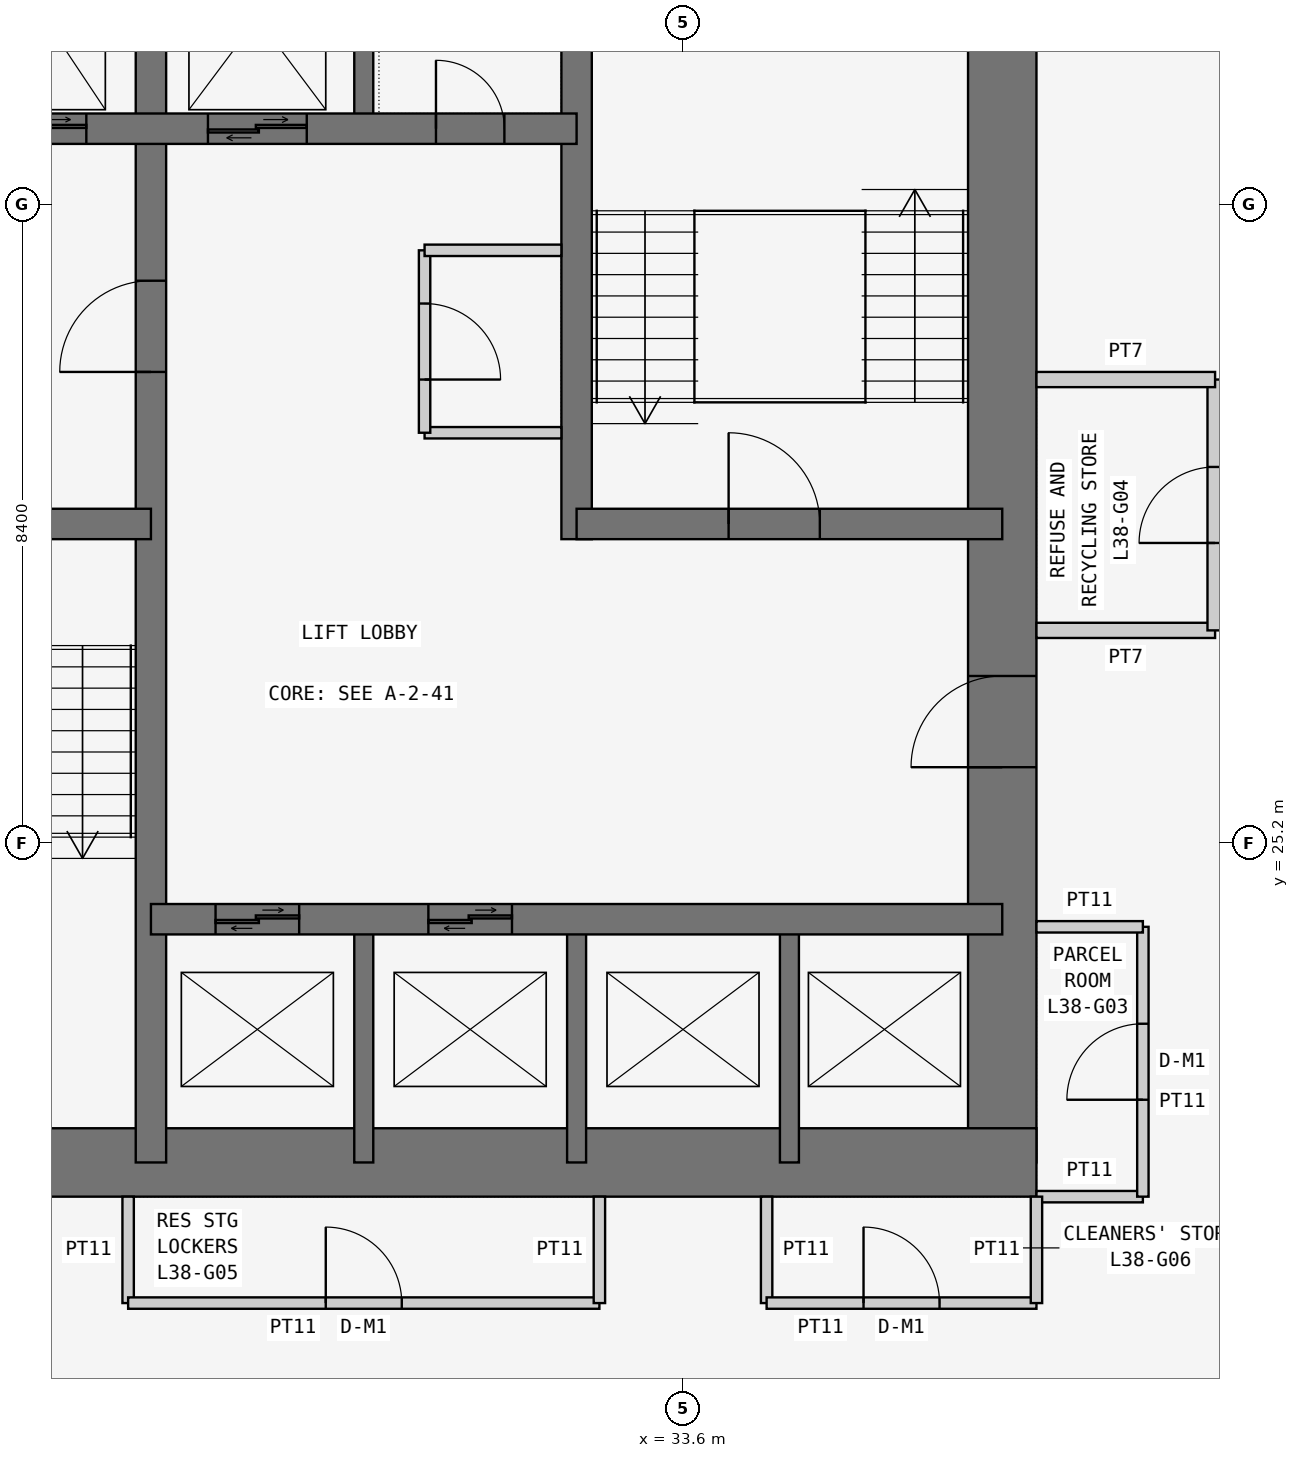
"""IFC4 building model, lengths in metres.
Left out: names, types, materials, properties, quantities, classifications, styles, units other than length and angle.
Written with IfcOpenShell. Run it as: python <this file> out.ifc"""

import sys

from ifc_helpers import new_model, si_unit, direction, frame, frame_2d, origin, place, context, subcontext, project, spatial, rectangle, extrude, element, fill, save


model = new_model("IFC4")
c1 = context("Model", 3, precision=1e-05, world=origin(), true_north=direction((0.0, 1.0)))
c2 = subcontext(c1, "Body", "Model", "MODEL_VIEW")
j1 = project(units=[si_unit("LENGTHUNIT", "METRE"), si_unit("PLANEANGLEUNIT", "RADIAN")], contexts=[c1])
p1 = place(None, origin())
s1 = spatial("IfcSite", under=j1, at=p1, CompositionType="ELEMENT")
p2 = place(p1, origin())
s2 = spatial("IfcBuilding", under=s1, at=p2, CompositionType="ELEMENT")
p3 = place(p2, frame((0.0, 0.0, 148.5)))
s3 = spatial("IfcBuildingStorey", under=s2, at=p3, CompositionType="ELEMENT", Elevation=148.5)
p4 = place(p3, frame((21.0, 21.0, 0.0), z_axis=(0.0, 0.0, 1.0), x_axis=(1.0, 0.0, 0.0)))
e1 = element("IfcWall", 1, at=p4, inside=s3, PredefinedType="SHEAR", context=c2, shape_type="SweptSolid", body=[
    extrude(rectangle(XDim=17.25, YDim=0.9, at=frame_2d((8.625, 0.0))), origin(), (0.0, 0.0, 1.0), 3.6),
])
p5 = place(p3, frame((37.8, 21.0, 0.0), z_axis=(0.0, 0.0, 1.0), x_axis=(0.0, 1.0, 0.0)))
e2 = element("IfcWall", 2, at=p5, inside=s3, PredefinedType="SHEAR", context=c2, shape_type="SweptSolid", body=[
    extrude(rectangle(XDim=17.25, YDim=0.9, at=frame_2d((8.625, 0.0))), origin(), (0.0, 0.0, 1.0), 3.6),
])
p6 = place(p5, frame((5.2, 0.0, 0.0)))
e3 = element("IfcOpeningElement", 3, at=p6, cuts=e2, PredefinedType="OPENING", context=c2, shape_type="SweptSolid", body=[
    extrude(rectangle(XDim=1.2, YDim=2.1, at=frame_2d((0.6, 1.05))), frame((0.0, 0.46, 0.0), z_axis=(0.0, -1.0, 0.0), x_axis=(1.0, 0.0, 0.0)), (0.0, 0.0, 1.0), 0.92),
])
p7 = place(p3, frame((26.6, 21.0, 0.0), z_axis=(0.0, 0.0, 1.0), x_axis=(0.0, 1.0, 0.0)))
e4 = element("IfcWall", 4, at=p7, inside=s3, PredefinedType="SHEAR", context=c2, shape_type="SweptSolid", body=[
    extrude(rectangle(XDim=16.8, YDim=0.4, at=frame_2d((8.4, 0.0))), origin(), (0.0, 0.0, 1.0), 3.6),
])
p8 = place(p7, frame((10.4, 0.0, 0.0)))
e5 = element("IfcOpeningElement", 5, at=p8, cuts=e4, PredefinedType="OPENING", context=c2, shape_type="SweptSolid", body=[
    extrude(rectangle(XDim=1.2, YDim=2.1, at=frame_2d((0.6, 1.05))), frame((0.0, 0.21, 0.0), z_axis=(0.0, -1.0, 0.0), x_axis=(1.0, 0.0, 0.0)), (0.0, 0.0, 1.0), 0.42),
])
p9 = place(p3, frame((21.0, 29.4, 0.0), z_axis=(0.0, 0.0, 1.0), x_axis=(1.0, 0.0, 0.0)))
e6 = element("IfcWall", 6, at=p9, inside=s3, PredefinedType="SHEAR", context=c2, shape_type="SweptSolid", body=[
    extrude(rectangle(XDim=5.6, YDim=0.4, at=frame_2d((2.8, 0.0))), origin(), (0.0, 0.0, 1.0), 3.6),
])
p10 = place(p9, frame((2.3, 0.0, 0.0)))
e7 = element("IfcOpeningElement", 7, at=p10, cuts=e6, PredefinedType="OPENING", context=c2, shape_type="SweptSolid", body=[
    extrude(rectangle(XDim=1.2, YDim=2.1, at=frame_2d((0.6, 1.05))), frame((0.0, 0.21, 0.0), z_axis=(0.0, -1.0, 0.0), x_axis=(1.0, 0.0, 0.0)), (0.0, 0.0, 1.0), 0.42),
])
p11 = place(p3, frame((21.0, 34.6, 0.0), z_axis=(0.0, 0.0, 1.0), x_axis=(1.0, 0.0, 0.0)))
e8 = element("IfcWall", 8, at=p11, inside=s3, PredefinedType="SHEAR", context=c2, shape_type="SweptSolid", body=[
    extrude(rectangle(XDim=11.2, YDim=0.4, at=frame_2d((5.6, 0.0))), origin(), (0.0, 0.0, 1.0), 3.6),
])
p12 = place(p11, frame((9.35, 0.0, 0.0)))
e9 = element("IfcOpeningElement", 9, at=p12, cuts=e8, PredefinedType="OPENING", context=c2, shape_type="SweptSolid", body=[
    extrude(rectangle(XDim=0.9, YDim=2.1, at=frame_2d((0.45, 1.05))), frame((0.0, 0.21, 0.0), z_axis=(0.0, -1.0, 0.0), x_axis=(1.0, 0.0, 0.0)), (0.0, 0.0, 1.0), 0.42),
])
p13 = place(p11, frame((1.0, 0.0, 0.0)))
e10 = element("IfcOpeningElement", 10, at=p13, cuts=e8, PredefinedType="OPENING", context=c2, shape_type="SweptSolid", body=[
    extrude(rectangle(XDim=1.1, YDim=2.1, at=frame_2d((0.55, 1.05))), frame((0.0, 0.21, 0.0), z_axis=(0.0, -1.0, 0.0), x_axis=(1.0, 0.0, 0.0)), (0.0, 0.0, 1.0), 0.42),
])
p14 = place(p11, frame((3.65, 0.0, 0.0)))
e11 = element("IfcOpeningElement", 11, at=p14, cuts=e8, PredefinedType="OPENING", context=c2, shape_type="SweptSolid", body=[
    extrude(rectangle(XDim=1.1, YDim=2.1, at=frame_2d((0.55, 1.05))), frame((0.0, 0.21, 0.0), z_axis=(0.0, -1.0, 0.0), x_axis=(1.0, 0.0, 0.0)), (0.0, 0.0, 1.0), 0.42),
])
p15 = place(p11, frame((6.35, 0.0, 0.0)))
e12 = element("IfcOpeningElement", 12, at=p15, cuts=e8, PredefinedType="OPENING", context=c2, shape_type="SweptSolid", body=[
    extrude(rectangle(XDim=1.3, YDim=2.1, at=frame_2d((0.65, 1.05))), frame((0.0, 0.21, 0.0), z_axis=(0.0, -1.0, 0.0), x_axis=(1.0, 0.0, 0.0)), (0.0, 0.0, 1.0), 0.42),
])
p16 = place(p3, frame((26.6, 24.2, 0.0), z_axis=(0.0, 0.0, 1.0), x_axis=(1.0, 0.0, 0.0)))
e13 = element("IfcWall", 13, at=p16, inside=s3, PredefinedType="SHEAR", context=c2, shape_type="SweptSolid", body=[
    extrude(rectangle(XDim=11.2, YDim=0.4, at=frame_2d((5.6, 0.0))), origin(), (0.0, 0.0, 1.0), 3.6),
])
p17 = place(p16, frame((0.85, 0.0, 0.0)))
e14 = element("IfcOpeningElement", 14, at=p17, cuts=e13, PredefinedType="OPENING", context=c2, shape_type="SweptSolid", body=[
    extrude(rectangle(XDim=1.1, YDim=2.1, at=frame_2d((0.55, 1.05))), frame((0.0, 0.21, 0.0), z_axis=(0.0, -1.0, 0.0), x_axis=(1.0, 0.0, 0.0)), (0.0, 0.0, 1.0), 0.42),
])
p18 = place(p16, frame((3.65, 0.0, 0.0)))
e15 = element("IfcOpeningElement", 15, at=p18, cuts=e13, PredefinedType="OPENING", context=c2, shape_type="SweptSolid", body=[
    extrude(rectangle(XDim=1.1, YDim=2.1, at=frame_2d((0.55, 1.05))), frame((0.0, 0.21, 0.0), z_axis=(0.0, -1.0, 0.0), x_axis=(1.0, 0.0, 0.0)), (0.0, 0.0, 1.0), 0.42),
])
p19 = place(p3, frame((32.2, 29.2, 0.0), z_axis=(0.0, 0.0, 1.0), x_axis=(0.0, 1.0, 0.0)))
e16 = element("IfcWall", 16, at=p19, inside=s3, PredefinedType="SHEAR", context=c2, shape_type="SweptSolid", body=[
    extrude(rectangle(XDim=8.6, YDim=0.4, at=frame_2d((4.3, 0.0))), origin(), (0.0, 0.0, 1.0), 3.6),
])
p20 = place(p3, frame((32.2, 29.4, 0.0), z_axis=(0.0, 0.0, 1.0), x_axis=(1.0, 0.0, 0.0)))
e17 = element("IfcWall", 17, at=p20, inside=s3, PredefinedType="SHEAR", context=c2, shape_type="SweptSolid", body=[
    extrude(rectangle(XDim=5.6, YDim=0.4, at=frame_2d((2.8, 0.0))), origin(), (0.0, 0.0, 1.0), 3.6),
])
p21 = place(p20, frame((2.0, 0.0, 0.0)))
e18 = element("IfcOpeningElement", 18, at=p21, cuts=e17, PredefinedType="OPENING", context=c2, shape_type="SweptSolid", body=[
    extrude(rectangle(XDim=1.2, YDim=2.1, at=frame_2d((0.6, 1.05))), frame((0.0, 0.21, 0.0), z_axis=(0.0, -1.0, 0.0), x_axis=(1.0, 0.0, 0.0)), (0.0, 0.0, 1.0), 0.42),
])
for number, where, z_axis, x_axis in (
    (19, (29.4, 21.0, 0.0), (0.0, 0.0, 1.0), (0.0, 1.0, 0.0)),
    (20, (32.2, 21.0, 0.0), (0.0, 0.0, 1.0), (0.0, 1.0, 0.0)),
    (21, (35.0, 21.0, 0.0), (0.0, 0.0, 1.0), (0.0, 1.0, 0.0)),
    (22, (29.4, 34.6, 0.0), (0.0, 0.0, 1.0), (0.0, 1.0, 0.0)),
):
    element("IfcWall", number, at=place(p3, frame(where, z_axis=z_axis, x_axis=x_axis)), inside=s3, PredefinedType="SHEAR", context=c2, shape_type="SweptSolid", body=[
        extrude(rectangle(XDim=3.2, YDim=0.25, at=frame_2d((1.6, 0.0))), origin(), (0.0, 0.0, 1.0), 3.6),
    ])
p22 = place(p3, frame((38.25, 20.55, 0.0), z_axis=(0.0, 0.0, 1.0), x_axis=(1.0, 0.0, 0.0)))
e23 = element("IfcWall", 23, at=p22, inside=s3, PredefinedType="PARTITIONING", context=c2, shape_type="SweptSolid", body=[
    extrude(rectangle(XDim=1.4, YDim=0.15, at=frame_2d((0.7, 0.0))), origin(), (0.0, 0.0, 1.0), 3.45),
])
p23 = place(p3, frame((39.65, 20.55, 0.0), z_axis=(0.0, 0.0, 1.0), x_axis=(0.0, 1.0, 0.0)))
e24 = element("IfcWall", 24, at=p23, inside=s3, PredefinedType="PARTITIONING", context=c2, shape_type="SweptSolid", body=[
    extrude(rectangle(XDim=3.55, YDim=0.15, at=frame_2d((1.775, 0.0))), origin(), (0.0, 0.0, 1.0), 3.45),
])
p24 = place(p23, frame((1.275, 0.0, 0.0)))
e25 = element("IfcOpeningElement", 25, at=p24, cuts=e24, PredefinedType="OPENING", context=c2, shape_type="SweptSolid", body=[
    extrude(rectangle(XDim=1.0, YDim=2.1, at=frame_2d((0.5, 1.05))), frame((0.0, 0.085, 0.0), z_axis=(0.0, -1.0, 0.0), x_axis=(1.0, 0.0, 0.0)), (0.0, 0.0, 1.0), 0.17),
])
p25 = place(p3, frame((39.65, 24.1, 0.0), z_axis=(0.0, 0.0, 1.0), x_axis=(-1.0, 0.0, 0.0)))
e26 = element("IfcWall", 26, at=p25, inside=s3, PredefinedType="PARTITIONING", context=c2, shape_type="SweptSolid", body=[
    extrude(rectangle(XDim=1.4, YDim=0.15, at=frame_2d((0.7, 0.0))), origin(), (0.0, 0.0, 1.0), 3.45),
])
p26 = place(p3, frame((38.25, 28.0, 0.0), z_axis=(0.0, 0.0, 1.0), x_axis=(1.0, 0.0, 0.0)))
e27 = element("IfcWall", 27, at=p26, inside=s3, PredefinedType="PARTITIONING", context=c2, shape_type="SweptSolid", body=[
    extrude(rectangle(XDim=2.35, YDim=0.2, at=frame_2d((1.175, 0.0))), origin(), (0.0, 0.0, 1.0), 3.45),
])
p27 = place(p3, frame((40.6, 28.0, 0.0), z_axis=(0.0, 0.0, 1.0), x_axis=(0.0, 1.0, 0.0)))
e28 = element("IfcWall", 28, at=p27, inside=s3, PredefinedType="PARTITIONING", context=c2, shape_type="SweptSolid", body=[
    extrude(rectangle(XDim=3.3, YDim=0.2, at=frame_2d((1.65, 0.0))), origin(), (0.0, 0.0, 1.0), 3.45),
])
p28 = place(p27, frame((1.15, 0.0, 0.0)))
e29 = element("IfcOpeningElement", 29, at=p28, cuts=e28, PredefinedType="OPENING", context=c2, shape_type="SweptSolid", body=[
    extrude(rectangle(XDim=1.0, YDim=2.1, at=frame_2d((0.5, 1.05))), frame((0.0, 0.11, 0.0), z_axis=(0.0, -1.0, 0.0), x_axis=(1.0, 0.0, 0.0)), (0.0, 0.0, 1.0), 0.22),
])
p29 = place(p3, frame((40.6, 31.3, 0.0), z_axis=(0.0, 0.0, 1.0), x_axis=(-1.0, 0.0, 0.0)))
e30 = element("IfcWall", 30, at=p29, inside=s3, PredefinedType="PARTITIONING", context=c2, shape_type="SweptSolid", body=[
    extrude(rectangle(XDim=2.35, YDim=0.2, at=frame_2d((1.175, 0.0))), origin(), (0.0, 0.0, 1.0), 3.45),
])
p30 = place(p3, frame((26.3, 20.55, 0.0), z_axis=(0.0, 0.0, 1.0), x_axis=(0.0, -1.0, 0.0)))
e31 = element("IfcWall", 31, at=p30, inside=s3, PredefinedType="PARTITIONING", context=c2, shape_type="SweptSolid", body=[
    extrude(rectangle(XDim=1.4, YDim=0.15, at=frame_2d((0.7, 0.0))), origin(), (0.0, 0.0, 1.0), 3.45),
])
p31 = place(p3, frame((26.3, 19.15, 0.0), z_axis=(0.0, 0.0, 1.0), x_axis=(1.0, 0.0, 0.0)))
e32 = element("IfcWall", 32, at=p31, inside=s3, PredefinedType="PARTITIONING", context=c2, shape_type="SweptSolid", body=[
    extrude(rectangle(XDim=6.2, YDim=0.15, at=frame_2d((3.1, 0.0))), origin(), (0.0, 0.0, 1.0), 3.45),
])
p32 = place(p31, frame((2.6, 0.0, 0.0)))
e33 = element("IfcOpeningElement", 33, at=p32, cuts=e32, PredefinedType="OPENING", context=c2, shape_type="SweptSolid", body=[
    extrude(rectangle(XDim=1.0, YDim=2.1, at=frame_2d((0.5, 1.05))), frame((0.0, 0.085, 0.0), z_axis=(0.0, -1.0, 0.0), x_axis=(1.0, 0.0, 0.0)), (0.0, 0.0, 1.0), 0.17),
])
for number, where, z_axis, x_axis in (
    (34, (32.5, 19.15, 0.0), (0.0, 0.0, 1.0), (0.0, 1.0, 0.0)),
    (35, (34.7, 20.55, 0.0), (0.0, 0.0, 1.0), (0.0, -1.0, 0.0)),
):
    element("IfcWall", number, at=place(p3, frame(where, z_axis=z_axis, x_axis=x_axis)), inside=s3, PredefinedType="PARTITIONING", context=c2, shape_type="SweptSolid", body=[
        extrude(rectangle(XDim=1.4, YDim=0.15, at=frame_2d((0.7, 0.0))), origin(), (0.0, 0.0, 1.0), 3.45),
    ])
p33 = place(p3, frame((34.7, 19.15, 0.0), z_axis=(0.0, 0.0, 1.0), x_axis=(1.0, 0.0, 0.0)))
e36 = element("IfcWall", 36, at=p33, inside=s3, PredefinedType="PARTITIONING", context=c2, shape_type="SweptSolid", body=[
    extrude(rectangle(XDim=3.55, YDim=0.15, at=frame_2d((1.775, 0.0))), origin(), (0.0, 0.0, 1.0), 3.45),
])
p34 = place(p33, frame((1.275, 0.0, 0.0)))
e37 = element("IfcOpeningElement", 37, at=p34, cuts=e36, PredefinedType="OPENING", context=c2, shape_type="SweptSolid", body=[
    extrude(rectangle(XDim=1.0, YDim=2.1, at=frame_2d((0.5, 1.05))), frame((0.0, 0.085, 0.0), z_axis=(0.0, -1.0, 0.0), x_axis=(1.0, 0.0, 0.0)), (0.0, 0.0, 1.0), 0.17),
])
p35 = place(p3, frame((38.25, 19.15, 0.0), z_axis=(0.0, 0.0, 1.0), x_axis=(0.0, 1.0, 0.0)))
e38 = element("IfcWall", 38, at=p35, inside=s3, PredefinedType="PARTITIONING", context=c2, shape_type="SweptSolid", body=[
    extrude(rectangle(XDim=1.4, YDim=0.15, at=frame_2d((0.7, 0.0))), origin(), (0.0, 0.0, 1.0), 3.45),
])
p36 = place(p3, frame((32.0, 30.6, 0.0), z_axis=(0.0, 0.0, 1.0), x_axis=(-1.0, 0.0, 0.0)))
e39 = element("IfcWall", 39, at=p36, inside=s3, PredefinedType="PARTITIONING", context=c2, shape_type="SweptSolid", body=[
    extrude(rectangle(XDim=1.8, YDim=0.15, at=frame_2d((0.9, 0.0))), origin(), (0.0, 0.0, 1.0), 3.45),
])
p37 = place(p3, frame((30.2, 30.6, 0.0), z_axis=(0.0, 0.0, 1.0), x_axis=(0.0, 1.0, 0.0)))
e40 = element("IfcWall", 40, at=p37, inside=s3, PredefinedType="PARTITIONING", context=c2, shape_type="SweptSolid", body=[
    extrude(rectangle(XDim=2.4, YDim=0.15, at=frame_2d((1.2, 0.0))), origin(), (0.0, 0.0, 1.0), 3.45),
])
p38 = place(p37, frame((0.7, 0.0, 0.0)))
e41 = element("IfcOpeningElement", 41, at=p38, cuts=e40, PredefinedType="OPENING", context=c2, shape_type="SweptSolid", body=[
    extrude(rectangle(XDim=1.0, YDim=2.1, at=frame_2d((0.5, 1.05))), frame((0.0, 0.085, 0.0), z_axis=(0.0, -1.0, 0.0), x_axis=(1.0, 0.0, 0.0)), (0.0, 0.0, 1.0), 0.17),
])
p39 = place(p3, frame((30.2, 33.0, 0.0), z_axis=(0.0, 0.0, 1.0), x_axis=(1.0, 0.0, 0.0)))
e42 = element("IfcWall", 42, at=p39, inside=s3, PredefinedType="PARTITIONING", context=c2, shape_type="SweptSolid", body=[
    extrude(rectangle(XDim=1.8, YDim=0.15, at=frame_2d((0.9, 0.0))), origin(), (0.0, 0.0, 1.0), 3.45),
])
p40 = place(p24, origin())
e43 = element("IfcDoor", 43, at=p40, inside=s3, OperationType="SINGLE_SWING_LEFT", PredefinedType="DOOR", context=c2, shape_type="SweptSolid", body=[
    extrude(rectangle(XDim=1.0, YDim=2.1, at=frame_2d((0.5, 1.05))), frame((0.0, 0.025, 0.0), z_axis=(0.0, -1.0, 0.0), x_axis=(1.0, 0.0, 0.0)), (0.0, 0.0, 1.0), 0.05),
])
fill(e25, e43)
p41 = place(p28, origin())
e44 = element("IfcDoor", 44, at=p41, inside=s3, OperationType="SINGLE_SWING_LEFT", PredefinedType="DOOR", context=c2, shape_type="SweptSolid", body=[
    extrude(rectangle(XDim=1.0, YDim=2.1, at=frame_2d((0.5, 1.05))), frame((0.0, 0.025, 0.0), z_axis=(0.0, -1.0, 0.0), x_axis=(1.0, 0.0, 0.0)), (0.0, 0.0, 1.0), 0.05),
])
fill(e29, e44)
p42 = place(p32, origin())
e45 = element("IfcDoor", 45, at=p42, inside=s3, OperationType="SINGLE_SWING_LEFT", PredefinedType="DOOR", context=c2, shape_type="SweptSolid", body=[
    extrude(rectangle(XDim=1.0, YDim=2.1, at=frame_2d((0.5, 1.05))), frame((0.0, 0.025, 0.0), z_axis=(0.0, -1.0, 0.0), x_axis=(1.0, 0.0, 0.0)), (0.0, 0.0, 1.0), 0.05),
])
fill(e33, e45)
p43 = place(p34, origin())
e46 = element("IfcDoor", 46, at=p43, inside=s3, OperationType="SINGLE_SWING_LEFT", PredefinedType="DOOR", context=c2, shape_type="SweptSolid", body=[
    extrude(rectangle(XDim=1.0, YDim=2.1, at=frame_2d((0.5, 1.05))), frame((0.0, 0.025, 0.0), z_axis=(0.0, -1.0, 0.0), x_axis=(1.0, 0.0, 0.0)), (0.0, 0.0, 1.0), 0.05),
])
fill(e37, e46)
p44 = place(p8, origin())
e47 = element("IfcDoor", 47, at=p44, inside=s3, OperationType="SINGLE_SWING_LEFT", PredefinedType="DOOR", context=c2, shape_type="SweptSolid", body=[
    extrude(rectangle(XDim=1.2, YDim=2.1, at=frame_2d((0.6, 1.05))), frame((0.0, 0.025, 0.0), z_axis=(0.0, -1.0, 0.0), x_axis=(1.0, 0.0, 0.0)), (0.0, 0.0, 1.0), 0.05),
])
fill(e5, e47)
p45 = place(p6, origin())
e48 = element("IfcDoor", 48, at=p45, inside=s3, OperationType="SINGLE_SWING_LEFT", PredefinedType="DOOR", context=c2, shape_type="SweptSolid", body=[
    extrude(rectangle(XDim=1.2, YDim=2.1, at=frame_2d((0.6, 1.05))), frame((0.0, 0.025, 0.0), z_axis=(0.0, -1.0, 0.0), x_axis=(1.0, 0.0, 0.0)), (0.0, 0.0, 1.0), 0.05),
])
fill(e3, e48)
p46 = place(p21, origin())
e49 = element("IfcDoor", 49, at=p46, inside=s3, OperationType="SINGLE_SWING_LEFT", PredefinedType="DOOR", context=c2, shape_type="SweptSolid", body=[
    extrude(rectangle(XDim=1.2, YDim=2.1, at=frame_2d((0.6, 1.05))), frame((0.0, 0.025, 0.0), z_axis=(0.0, -1.0, 0.0), x_axis=(1.0, 0.0, 0.0)), (0.0, 0.0, 1.0), 0.05),
])
fill(e18, e49)
p47 = place(p12, origin())
e50 = element("IfcDoor", 50, at=p47, inside=s3, OperationType="SINGLE_SWING_LEFT", PredefinedType="DOOR", context=c2, shape_type="SweptSolid", body=[
    extrude(rectangle(XDim=0.9, YDim=2.1, at=frame_2d((0.45, 1.05))), frame((0.0, 0.025, 0.0), z_axis=(0.0, -1.0, 0.0), x_axis=(1.0, 0.0, 0.0)), (0.0, 0.0, 1.0), 0.05),
])
fill(e9, e50)
p48 = place(p38, frame((1.0, 0.0, 0.0), z_axis=(0.0, 0.0, 1.0), x_axis=(-1.0, 0.0, 0.0)))
e51 = element("IfcDoor", 51, at=p48, inside=s3, OperationType="SINGLE_SWING_RIGHT", PredefinedType="DOOR", context=c2, shape_type="SweptSolid", body=[
    extrude(rectangle(XDim=1.0, YDim=2.1, at=frame_2d((0.5, 1.05))), frame((0.0, 0.025, 0.0), z_axis=(0.0, -1.0, 0.0), x_axis=(1.0, 0.0, 0.0)), (0.0, 0.0, 1.0), 0.05),
])
fill(e41, e51)
p49 = place(p17, origin())
e52 = element("IfcDoor", 52, at=p49, inside=s3, OperationType="DOUBLE_DOOR_SLIDING", PredefinedType="DOOR", context=c2, shape_type="SweptSolid", body=[
    extrude(rectangle(XDim=1.1, YDim=2.1, at=frame_2d((0.55, 1.05))), frame((0.0, 0.025, 0.0), z_axis=(0.0, -1.0, 0.0), x_axis=(1.0, 0.0, 0.0)), (0.0, 0.0, 1.0), 0.05),
])
fill(e14, e52)
p50 = place(p18, origin())
e53 = element("IfcDoor", 53, at=p50, inside=s3, OperationType="DOUBLE_DOOR_SLIDING", PredefinedType="DOOR", context=c2, shape_type="SweptSolid", body=[
    extrude(rectangle(XDim=1.1, YDim=2.1, at=frame_2d((0.55, 1.05))), frame((0.0, 0.025, 0.0), z_axis=(0.0, -1.0, 0.0), x_axis=(1.0, 0.0, 0.0)), (0.0, 0.0, 1.0), 0.05),
])
fill(e15, e53)
p51 = place(p14, origin())
e54 = element("IfcDoor", 54, at=p51, inside=s3, OperationType="DOUBLE_DOOR_SLIDING", PredefinedType="DOOR", context=c2, shape_type="SweptSolid", body=[
    extrude(rectangle(XDim=1.1, YDim=2.1, at=frame_2d((0.55, 1.05))), frame((0.0, 0.025, 0.0), z_axis=(0.0, -1.0, 0.0), x_axis=(1.0, 0.0, 0.0)), (0.0, 0.0, 1.0), 0.05),
])
fill(e11, e54)
p52 = place(p15, origin())
e55 = element("IfcDoor", 55, at=p52, inside=s3, OperationType="DOUBLE_DOOR_SLIDING", PredefinedType="DOOR", context=c2, shape_type="SweptSolid", body=[
    extrude(rectangle(XDim=1.3, YDim=2.1, at=frame_2d((0.65, 1.05))), frame((0.0, 0.025, 0.0), z_axis=(0.0, -1.0, 0.0), x_axis=(1.0, 0.0, 0.0)), (0.0, 0.0, 1.0), 0.05),
])
fill(e12, e55)
save(model, sys.argv[1])
